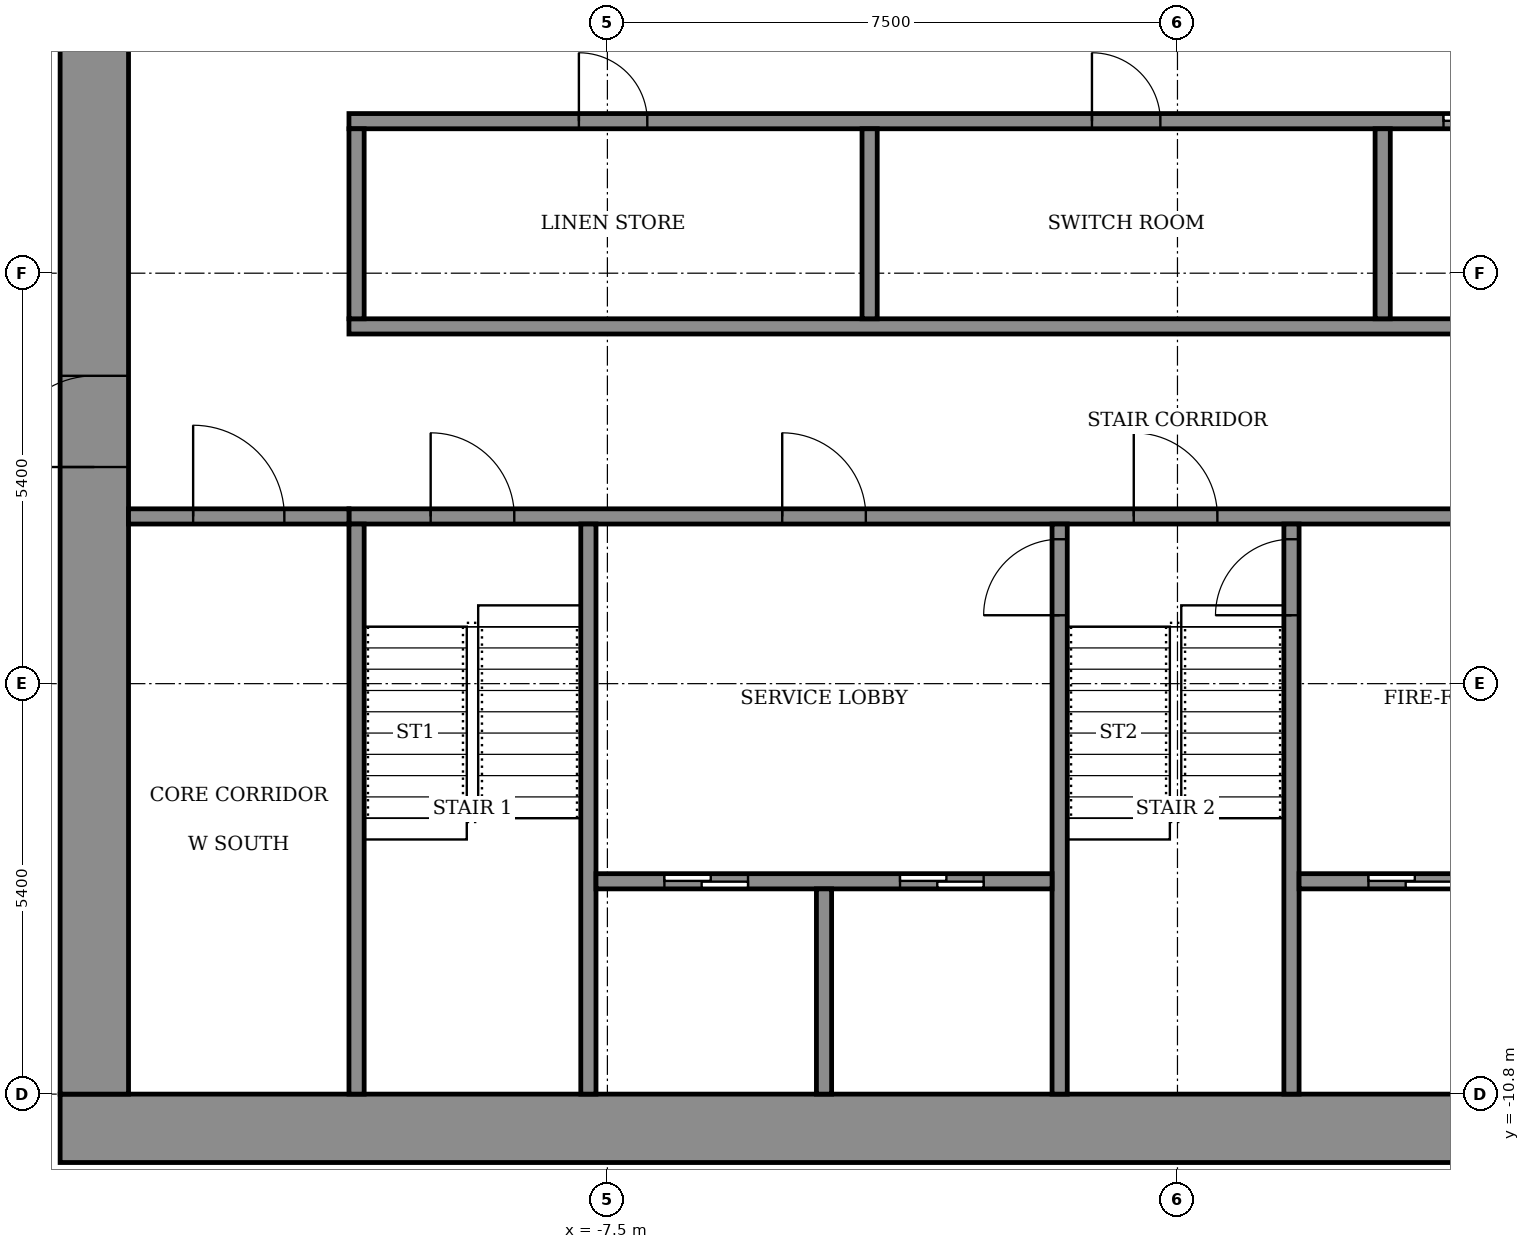
"""IFC4 building model, lengths in metres.
Left out: names, types, materials, properties, quantities, classifications, styles, units other than length and angle.
Written with IfcOpenShell. Run it as: python <this file> out.ifc"""

import sys

from ifc_helpers import new_model, si_unit, direction, frame, frame_2d, origin, place, context, subcontext, project, spatial, rectangle, extrude, element, fill, save


model = new_model("IFC4")
c1 = context("Model", 3, precision=1e-05, world=origin(), true_north=direction((0.0, 1.0)))
c2 = subcontext(c1, "Body", "Model", "MODEL_VIEW")
j1 = project(units=[si_unit("LENGTHUNIT", "METRE"), si_unit("PLANEANGLEUNIT", "RADIAN")], contexts=[c1])
p1 = place(None, origin())
s1 = spatial("IfcSite", under=j1, at=p1, CompositionType="ELEMENT")
p2 = place(p1, origin())
s2 = spatial("IfcBuilding", under=s1, at=p2, CompositionType="ELEMENT")
p3 = place(p2, frame((0.0, 0.0, 189.7)))
s3 = spatial("IfcBuildingStorey", under=s2, at=p3, CompositionType="ELEMENT", Elevation=189.7)
p4 = place(p3, frame((-14.7, -11.25, 0.0), z_axis=(0.0, 0.0, 1.0), x_axis=(1.0, 0.0, 0.0)))
e1 = element("IfcWall", 1, at=p4, inside=s3, PredefinedType="SHEAR", context=c2, shape_type="SweptSolid", body=[
    extrude(rectangle(XDim=29.4, YDim=0.9, at=frame_2d((14.7, 0.0))), origin(), (0.0, 0.0, 1.0), 3.6),
])
p5 = place(p3, frame((-14.25, -10.8, 0.0), z_axis=(0.0, 0.0, 1.0), x_axis=(0.0, 1.0, 0.0)))
e2 = element("IfcWall", 2, at=p5, inside=s3, PredefinedType="SHEAR", context=c2, shape_type="SweptSolid", body=[
    extrude(rectangle(XDim=21.6, YDim=0.9, at=frame_2d((10.8, 0.0))), origin(), (0.0, 0.0, 1.0), 3.6),
])
p6 = place(p5, frame((8.25, 0.0, 0.0)))
e3 = element("IfcOpeningElement", 3, at=p6, cuts=e2, PredefinedType="OPENING", context=c2, shape_type="SweptSolid", body=[
    extrude(rectangle(XDim=1.2, YDim=2.1, at=frame_2d((0.6, 1.05))), frame((0.0, 0.46, 0.0), z_axis=(0.0, -1.0, 0.0), x_axis=(1.0, 0.0, 0.0)), (0.0, 0.0, 1.0), 0.92),
])
p7 = place(p5, frame((15.25, 0.0, 0.0)))
e4 = element("IfcOpeningElement", 4, at=p7, cuts=e2, PredefinedType="OPENING", context=c2, shape_type="SweptSolid", body=[
    extrude(rectangle(XDim=1.2, YDim=2.1, at=frame_2d((0.6, 1.05))), frame((0.0, 0.46, 0.0), z_axis=(0.0, -1.0, 0.0), x_axis=(1.0, 0.0, 0.0)), (0.0, 0.0, 1.0), 0.92),
])
p8 = place(p3, frame((-10.9, -3.2, 0.0), z_axis=(0.0, 0.0, 1.0), x_axis=(1.0, 0.0, 0.0)))
e5 = element("IfcWall", 5, at=p8, inside=s3, PredefinedType="SHEAR", context=c2, shape_type="SweptSolid", body=[
    extrude(rectangle(XDim=21.8, YDim=0.2, at=frame_2d((10.9, 0.0))), origin(), (0.0, 0.0, 1.0), 3.05),
])
p9 = place(p8, frame((1.075, 0.0, 0.0)))
e6 = element("IfcOpeningElement", 6, at=p9, cuts=e5, PredefinedType="OPENING", context=c2, shape_type="SweptSolid", body=[
    extrude(rectangle(XDim=1.1, YDim=2.1, at=frame_2d((0.55, 1.05))), frame((0.0, 0.11, 0.0), z_axis=(0.0, -1.0, 0.0), x_axis=(1.0, 0.0, 0.0)), (0.0, 0.0, 1.0), 0.22),
])
p10 = place(p8, frame((10.325, 0.0, 0.0)))
e7 = element("IfcOpeningElement", 7, at=p10, cuts=e5, PredefinedType="OPENING", context=c2, shape_type="SweptSolid", body=[
    extrude(rectangle(XDim=1.1, YDim=2.1, at=frame_2d((0.55, 1.05))), frame((0.0, 0.11, 0.0), z_axis=(0.0, -1.0, 0.0), x_axis=(1.0, 0.0, 0.0)), (0.0, 0.0, 1.0), 0.22),
])
p11 = place(p8, frame((19.625, 0.0, 0.0)))
e8 = element("IfcOpeningElement", 8, at=p11, cuts=e5, PredefinedType="OPENING", context=c2, shape_type="SweptSolid", body=[
    extrude(rectangle(XDim=1.1, YDim=2.1, at=frame_2d((0.55, 1.05))), frame((0.0, 0.11, 0.0), z_axis=(0.0, -1.0, 0.0), x_axis=(1.0, 0.0, 0.0)), (0.0, 0.0, 1.0), 0.22),
])
p12 = place(p8, frame((5.7, 0.0, 0.0)))
e9 = element("IfcOpeningElement", 9, at=p12, cuts=e5, PredefinedType="OPENING", context=c2, shape_type="SweptSolid", body=[
    extrude(rectangle(XDim=1.1, YDim=2.1, at=frame_2d((0.55, 1.05))), frame((0.0, 0.11, 0.0), z_axis=(0.0, -1.0, 0.0), x_axis=(1.0, 0.0, 0.0)), (0.0, 0.0, 1.0), 0.22),
])
p13 = place(p8, frame((14.975, 0.0, 0.0)))
e10 = element("IfcOpeningElement", 10, at=p13, cuts=e5, PredefinedType="OPENING", context=c2, shape_type="SweptSolid", body=[
    extrude(rectangle(XDim=1.1, YDim=2.1, at=frame_2d((0.55, 1.05))), frame((0.0, 0.11, 0.0), z_axis=(0.0, -1.0, 0.0), x_axis=(1.0, 0.0, 0.0)), (0.0, 0.0, 1.0), 0.22),
])
p14 = place(p3, frame((-10.9, -0.7, 0.0), z_axis=(0.0, 0.0, 1.0), x_axis=(1.0, 0.0, 0.0)))
e11 = element("IfcWall", 11, at=p14, inside=s3, PredefinedType="SHEAR", context=c2, shape_type="SweptSolid", body=[
    extrude(rectangle(XDim=21.8, YDim=0.2, at=frame_2d((10.9, 0.0))), origin(), (0.0, 0.0, 1.0), 3.05),
])
p15 = place(p3, frame((-10.9, 2.0, 0.0), z_axis=(0.0, 0.0, 1.0), x_axis=(1.0, 0.0, 0.0)))
e12 = element("IfcWall", 12, at=p15, inside=s3, PredefinedType="SHEAR", context=c2, shape_type="SweptSolid", body=[
    extrude(rectangle(XDim=21.8, YDim=0.2, at=frame_2d((10.9, 0.0))), origin(), (0.0, 0.0, 1.0), 3.05),
])
p16 = place(p15, frame((14.4, 0.0, 0.0)))
e13 = element("IfcOpeningElement", 13, at=p16, cuts=e12, PredefinedType="OPENING", context=c2, shape_type="SweptSolid", body=[
    extrude(rectangle(XDim=1.1, YDim=2.1, at=frame_2d((0.55, 1.05))), frame((0.0, 0.11, 0.0), z_axis=(0.0, -1.0, 0.0), x_axis=(1.0, 0.0, 0.0)), (0.0, 0.0, 1.0), 0.22),
])
p17 = place(p15, frame((17.1, 0.0, 0.0)))
e14 = element("IfcOpeningElement", 14, at=p17, cuts=e12, PredefinedType="OPENING", context=c2, shape_type="SweptSolid", body=[
    extrude(rectangle(XDim=1.1, YDim=2.1, at=frame_2d((0.55, 1.05))), frame((0.0, 0.11, 0.0), z_axis=(0.0, -1.0, 0.0), x_axis=(1.0, 0.0, 0.0)), (0.0, 0.0, 1.0), 0.22),
])
p18 = place(p15, frame((19.8, 0.0, 0.0)))
e15 = element("IfcOpeningElement", 15, at=p18, cuts=e12, PredefinedType="OPENING", context=c2, shape_type="SweptSolid", body=[
    extrude(rectangle(XDim=1.1, YDim=2.1, at=frame_2d((0.55, 1.05))), frame((0.0, 0.11, 0.0), z_axis=(0.0, -1.0, 0.0), x_axis=(1.0, 0.0, 0.0)), (0.0, 0.0, 1.0), 0.22),
])
p19 = place(p15, frame((3.025, 0.0, 0.0)))
e16 = element("IfcOpeningElement", 16, at=p19, cuts=e12, PredefinedType="OPENING", context=c2, shape_type="SweptSolid", body=[
    extrude(rectangle(XDim=0.9, YDim=2.1, at=frame_2d((0.45, 1.05))), frame((0.0, 0.11, 0.0), z_axis=(0.0, -1.0, 0.0), x_axis=(1.0, 0.0, 0.0)), (0.0, 0.0, 1.0), 0.22),
])
p20 = place(p15, frame((9.775, 0.0, 0.0)))
e17 = element("IfcOpeningElement", 17, at=p20, cuts=e12, PredefinedType="OPENING", context=c2, shape_type="SweptSolid", body=[
    extrude(rectangle(XDim=0.9, YDim=2.1, at=frame_2d((0.45, 1.05))), frame((0.0, 0.11, 0.0), z_axis=(0.0, -1.0, 0.0), x_axis=(1.0, 0.0, 0.0)), (0.0, 0.0, 1.0), 0.22),
])
for number, where, z_axis, x_axis in (
    (18, (-10.8, -10.8, 0.0), (0.0, 0.0, 1.0), (0.0, 1.0, 0.0)),
    (19, (-7.75, -10.8, 0.0), (0.0, 0.0, 1.0), (0.0, 1.0, 0.0)),
):
    element("IfcWall", number, at=place(p3, frame(where, z_axis=z_axis, x_axis=x_axis)), inside=s3, PredefinedType="SHEAR", context=c2, shape_type="SweptSolid", body=[
        extrude(rectangle(XDim=7.5, YDim=0.2, at=frame_2d((3.75, 0.0))), origin(), (0.0, 0.0, 1.0), 3.05),
    ])
p21 = place(p3, frame((-1.55, -10.8, 0.0), z_axis=(0.0, 0.0, 1.0), x_axis=(0.0, 1.0, 0.0)))
e20 = element("IfcWall", 20, at=p21, inside=s3, PredefinedType="SHEAR", context=c2, shape_type="SweptSolid", body=[
    extrude(rectangle(XDim=7.5, YDim=0.2, at=frame_2d((3.75, 0.0))), origin(), (0.0, 0.0, 1.0), 3.05),
])
p22 = place(p21, frame((6.3, 0.0, 0.0)))
e21 = element("IfcOpeningElement", 21, at=p22, cuts=e20, PredefinedType="OPENING", context=c2, shape_type="SweptSolid", body=[
    extrude(rectangle(XDim=1.0, YDim=2.1, at=frame_2d((0.5, 1.05))), frame((0.0, 0.11, 0.0), z_axis=(0.0, -1.0, 0.0), x_axis=(1.0, 0.0, 0.0)), (0.0, 0.0, 1.0), 0.22),
])
p23 = place(p3, frame((1.5, -10.8, 0.0), z_axis=(0.0, 0.0, 1.0), x_axis=(0.0, 1.0, 0.0)))
e22 = element("IfcWall", 22, at=p23, inside=s3, PredefinedType="SHEAR", context=c2, shape_type="SweptSolid", body=[
    extrude(rectangle(XDim=7.5, YDim=0.2, at=frame_2d((3.75, 0.0))), origin(), (0.0, 0.0, 1.0), 3.05),
])
p24 = place(p23, frame((6.3, 0.0, 0.0)))
e23 = element("IfcOpeningElement", 23, at=p24, cuts=e22, PredefinedType="OPENING", context=c2, shape_type="SweptSolid", body=[
    extrude(rectangle(XDim=1.0, YDim=2.1, at=frame_2d((0.5, 1.05))), frame((0.0, 0.11, 0.0), z_axis=(0.0, -1.0, 0.0), x_axis=(1.0, 0.0, 0.0)), (0.0, 0.0, 1.0), 0.22),
])
p25 = place(p3, frame((-7.65, -8.0, 0.0), z_axis=(0.0, 0.0, 1.0), x_axis=(1.0, 0.0, 0.0)))
e24 = element("IfcWall", 24, at=p25, inside=s3, PredefinedType="SHEAR", context=c2, shape_type="SweptSolid", body=[
    extrude(rectangle(XDim=6.0, YDim=0.2, at=frame_2d((3.0, 0.0))), origin(), (0.0, 0.0, 1.0), 3.05),
])
p26 = place(p25, frame((0.9, 0.0, 0.0)))
e25 = element("IfcOpeningElement", 25, at=p26, cuts=e24, PredefinedType="OPENING", context=c2, shape_type="SweptSolid", body=[
    extrude(rectangle(XDim=1.1, YDim=2.1, at=frame_2d((0.55, 1.05))), frame((0.0, 0.11, 0.0), z_axis=(0.0, -1.0, 0.0), x_axis=(1.0, 0.0, 0.0)), (0.0, 0.0, 1.0), 0.22),
])
p27 = place(p25, frame((4.0, 0.0, 0.0)))
e26 = element("IfcOpeningElement", 26, at=p27, cuts=e24, PredefinedType="OPENING", context=c2, shape_type="SweptSolid", body=[
    extrude(rectangle(XDim=1.1, YDim=2.1, at=frame_2d((0.55, 1.05))), frame((0.0, 0.11, 0.0), z_axis=(0.0, -1.0, 0.0), x_axis=(1.0, 0.0, 0.0)), (0.0, 0.0, 1.0), 0.22),
])
p28 = place(p3, frame((-4.65, -10.8, 0.0), z_axis=(0.0, 0.0, 1.0), x_axis=(0.0, 1.0, 0.0)))
e27 = element("IfcWall", 27, at=p28, inside=s3, PredefinedType="SHEAR", context=c2, shape_type="SweptSolid", body=[
    extrude(rectangle(XDim=2.7, YDim=0.2, at=frame_2d((1.35, 0.0))), origin(), (0.0, 0.0, 1.0), 3.05),
])
p29 = place(p3, frame((1.6, -8.0, 0.0), z_axis=(0.0, 0.0, 1.0), x_axis=(1.0, 0.0, 0.0)))
e28 = element("IfcWall", 28, at=p29, inside=s3, PredefinedType="SHEAR", context=c2, shape_type="SweptSolid", body=[
    extrude(rectangle(XDim=6.05, YDim=0.2, at=frame_2d((3.025, 0.0))), origin(), (0.0, 0.0, 1.0), 3.05),
])
p30 = place(p29, frame((0.913, 0.0, 0.0)))
e29 = element("IfcOpeningElement", 29, at=p30, cuts=e28, PredefinedType="OPENING", context=c2, shape_type="SweptSolid", body=[
    extrude(rectangle(XDim=1.1, YDim=2.1, at=frame_2d((0.55, 1.05))), frame((0.0, 0.11, 0.0), z_axis=(0.0, -1.0, 0.0), x_axis=(1.0, 0.0, 0.0)), (0.0, 0.0, 1.0), 0.22),
])
p31 = place(p29, frame((4.038, 0.0, 0.0)))
e30 = element("IfcOpeningElement", 30, at=p31, cuts=e28, PredefinedType="OPENING", context=c2, shape_type="SweptSolid", body=[
    extrude(rectangle(XDim=1.1, YDim=2.1, at=frame_2d((0.55, 1.05))), frame((0.0, 0.11, 0.0), z_axis=(0.0, -1.0, 0.0), x_axis=(1.0, 0.0, 0.0)), (0.0, 0.0, 1.0), 0.22),
])
for number, where, z_axis, x_axis in (
    (31, (-10.8, -0.6, 0.0), (0.0, 0.0, 1.0), (0.0, 1.0, 0.0)),
    (32, (-4.05, -0.6, 0.0), (0.0, 0.0, 1.0), (0.0, 1.0, 0.0)),
):
    element("IfcWall", number, at=place(p3, frame(where, z_axis=z_axis, x_axis=x_axis)), inside=s3, PredefinedType="STANDARD", context=c2, shape_type="SweptSolid", body=[
        extrude(rectangle(XDim=2.5, YDim=0.2, at=frame_2d((1.25, 0.0))), origin(), (0.0, 0.0, 1.0), 3.05),
    ])
p32 = place(p3, frame((2.7, -0.6, 0.0), z_axis=(0.0, 0.0, 1.0), x_axis=(0.0, 1.0, 0.0)))
e33 = element("IfcWall", 33, at=p32, inside=s3, PredefinedType="SHEAR", context=c2, shape_type="SweptSolid", body=[
    extrude(rectangle(XDim=2.5, YDim=0.2, at=frame_2d((1.25, 0.0))), origin(), (0.0, 0.0, 1.0), 3.05),
])
p33 = place(p3, frame((-13.8, -3.2, 0.0), z_axis=(0.0, 0.0, 1.0), x_axis=(1.0, 0.0, 0.0)))
e34 = element("IfcWall", 34, at=p33, inside=s3, PredefinedType="STANDARD", context=c2, shape_type="SweptSolid", body=[
    extrude(rectangle(XDim=2.9, YDim=0.2, at=frame_2d((1.45, 0.0))), origin(), (0.0, 0.0, 1.0), 3.05),
])
p34 = place(p33, frame((0.85, 0.0, 0.0)))
e35 = element("IfcOpeningElement", 35, at=p34, cuts=e34, PredefinedType="OPENING", context=c2, shape_type="SweptSolid", body=[
    extrude(rectangle(XDim=1.2, YDim=2.1, at=frame_2d((0.6, 1.05))), frame((0.0, 0.11, 0.0), z_axis=(0.0, -1.0, 0.0), x_axis=(1.0, 0.0, 0.0)), (0.0, 0.0, 1.0), 0.22),
])
p35 = place(p6, origin())
e36 = element("IfcDoor", 36, at=p35, inside=s3, OperationType="DOUBLE_DOOR_SINGLE_SWING", PredefinedType="DOOR", context=c2, shape_type="SweptSolid", body=[
    extrude(rectangle(XDim=1.2, YDim=2.1, at=frame_2d((0.6, 1.05))), frame((0.0, 0.025, 0.0), z_axis=(0.0, -1.0, 0.0), x_axis=(1.0, 0.0, 0.0)), (0.0, 0.0, 1.0), 0.05),
])
fill(e3, e36)
p36 = place(p16, origin())
e37 = element("IfcDoor", 37, at=p36, inside=s3, OperationType="SLIDING_TO_LEFT", PredefinedType="DOOR", context=c2, shape_type="SweptSolid", body=[
    extrude(rectangle(XDim=1.1, YDim=2.1, at=frame_2d((0.55, 1.05))), frame((0.0, 0.025, 0.0), z_axis=(0.0, -1.0, 0.0), x_axis=(1.0, 0.0, 0.0)), (0.0, 0.0, 1.0), 0.05),
])
fill(e13, e37)
p37 = place(p19, origin())
e38 = element("IfcDoor", 38, at=p37, inside=s3, OperationType="SINGLE_SWING_RIGHT", PredefinedType="DOOR", context=c2, shape_type="SweptSolid", body=[
    extrude(rectangle(XDim=0.9, YDim=2.1, at=frame_2d((0.45, 1.05))), frame((0.0, 0.025, 0.0), z_axis=(0.0, -1.0, 0.0), x_axis=(1.0, 0.0, 0.0)), (0.0, 0.0, 1.0), 0.05),
])
fill(e16, e38)
p38 = place(p20, origin())
e39 = element("IfcDoor", 39, at=p38, inside=s3, OperationType="SINGLE_SWING_LEFT", PredefinedType="DOOR", context=c2, shape_type="SweptSolid", body=[
    extrude(rectangle(XDim=0.9, YDim=2.1, at=frame_2d((0.45, 1.05))), frame((0.0, 0.025, 0.0), z_axis=(0.0, -1.0, 0.0), x_axis=(1.0, 0.0, 0.0)), (0.0, 0.0, 1.0), 0.05),
])
fill(e17, e39)
p39 = place(p30, origin())
e40 = element("IfcDoor", 40, at=p39, inside=s3, OperationType="SLIDING_TO_LEFT", PredefinedType="DOOR", context=c2, shape_type="SweptSolid", body=[
    extrude(rectangle(XDim=1.1, YDim=2.1, at=frame_2d((0.55, 1.05))), frame((0.0, 0.025, 0.0), z_axis=(0.0, -1.0, 0.0), x_axis=(1.0, 0.0, 0.0)), (0.0, 0.0, 1.0), 0.05),
])
fill(e29, e40)
p40 = place(p26, origin())
e41 = element("IfcDoor", 41, at=p40, inside=s3, OperationType="SLIDING_TO_LEFT", PredefinedType="DOOR", context=c2, shape_type="SweptSolid", body=[
    extrude(rectangle(XDim=1.1, YDim=2.1, at=frame_2d((0.55, 1.05))), frame((0.0, 0.025, 0.0), z_axis=(0.0, -1.0, 0.0), x_axis=(1.0, 0.0, 0.0)), (0.0, 0.0, 1.0), 0.05),
])
fill(e25, e41)
p41 = place(p27, origin())
e42 = element("IfcDoor", 42, at=p41, inside=s3, OperationType="SLIDING_TO_LEFT", PredefinedType="DOOR", context=c2, shape_type="SweptSolid", body=[
    extrude(rectangle(XDim=1.1, YDim=2.1, at=frame_2d((0.55, 1.05))), frame((0.0, 0.025, 0.0), z_axis=(0.0, -1.0, 0.0), x_axis=(1.0, 0.0, 0.0)), (0.0, 0.0, 1.0), 0.05),
])
fill(e26, e42)
p42 = place(p9, origin())
e43 = element("IfcDoor", 43, at=p42, inside=s3, OperationType="SINGLE_SWING_RIGHT", PredefinedType="DOOR", context=c2, shape_type="SweptSolid", body=[
    extrude(rectangle(XDim=1.1, YDim=2.1, at=frame_2d((0.55, 1.05))), frame((0.0, 0.025, 0.0), z_axis=(0.0, -1.0, 0.0), x_axis=(1.0, 0.0, 0.0)), (0.0, 0.0, 1.0), 0.05),
])
fill(e6, e43)
p43 = place(p10, origin())
e44 = element("IfcDoor", 44, at=p43, inside=s3, OperationType="SINGLE_SWING_RIGHT", PredefinedType="DOOR", context=c2, shape_type="SweptSolid", body=[
    extrude(rectangle(XDim=1.1, YDim=2.1, at=frame_2d((0.55, 1.05))), frame((0.0, 0.025, 0.0), z_axis=(0.0, -1.0, 0.0), x_axis=(1.0, 0.0, 0.0)), (0.0, 0.0, 1.0), 0.05),
])
fill(e7, e44)
p44 = place(p12, origin())
e45 = element("IfcDoor", 45, at=p44, inside=s3, OperationType="SINGLE_SWING_LEFT", PredefinedType="DOOR", context=c2, shape_type="SweptSolid", body=[
    extrude(rectangle(XDim=1.1, YDim=2.1, at=frame_2d((0.55, 1.05))), frame((0.0, 0.025, 0.0), z_axis=(0.0, -1.0, 0.0), x_axis=(1.0, 0.0, 0.0)), (0.0, 0.0, 1.0), 0.05),
])
fill(e9, e45)
p45 = place(p22, origin())
e46 = element("IfcDoor", 46, at=p45, inside=s3, OperationType="SINGLE_SWING_RIGHT", PredefinedType="DOOR", context=c2, shape_type="SweptSolid", body=[
    extrude(rectangle(XDim=1.0, YDim=2.1, at=frame_2d((0.5, 1.05))), frame((0.0, 0.025, 0.0), z_axis=(0.0, -1.0, 0.0), x_axis=(1.0, 0.0, 0.0)), (0.0, 0.0, 1.0), 0.05),
])
fill(e21, e46)
p46 = place(p24, origin())
e47 = element("IfcDoor", 47, at=p46, inside=s3, OperationType="SINGLE_SWING_RIGHT", PredefinedType="DOOR", context=c2, shape_type="SweptSolid", body=[
    extrude(rectangle(XDim=1.0, YDim=2.1, at=frame_2d((0.5, 1.05))), frame((0.0, 0.025, 0.0), z_axis=(0.0, -1.0, 0.0), x_axis=(1.0, 0.0, 0.0)), (0.0, 0.0, 1.0), 0.05),
])
fill(e23, e47)
p47 = place(p34, origin())
e48 = element("IfcDoor", 48, at=p47, inside=s3, OperationType="SINGLE_SWING_LEFT", PredefinedType="DOOR", context=c2, shape_type="SweptSolid", body=[
    extrude(rectangle(XDim=1.2, YDim=2.1, at=frame_2d((0.6, 1.05))), frame((0.0, 0.025, 0.0), z_axis=(0.0, -1.0, 0.0), x_axis=(1.0, 0.0, 0.0)), (0.0, 0.0, 1.0), 0.05),
])
fill(e35, e48)
save(model, sys.argv[1])
